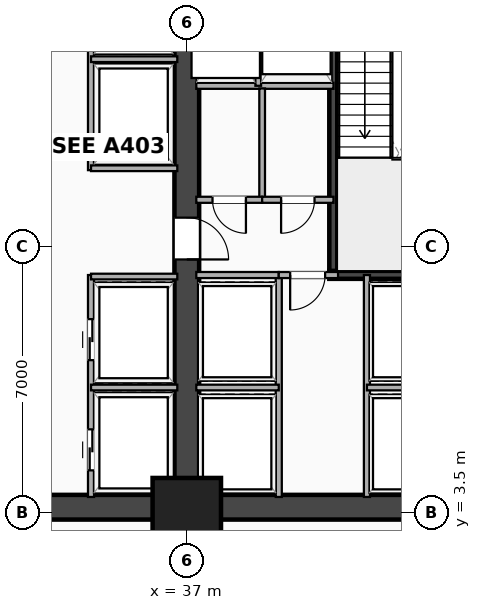
"""IFC4 building model, lengths in metres.
Left out: names, types, materials, properties, quantities, classifications, styles, units other than length and angle.
Written with IfcOpenShell. Run it as: python <this file> out.ifc"""

import sys

from ifc_helpers import new_model, si_unit, direction, frame, frame_2d, origin, origin_2d, place, context, subcontext, project, spatial, rectangle, extrude, element, fill, save


model = new_model("IFC4")
c1 = context("Model", 3, precision=1e-05, world=origin(), true_north=direction((0.0, 1.0)))
c2 = subcontext(c1, "Body", "Model", "MODEL_VIEW")
j1 = project(units=[si_unit("LENGTHUNIT", "METRE"), si_unit("PLANEANGLEUNIT", "RADIAN")], contexts=[c1])
p1 = place(None, origin())
s1 = spatial("IfcSite", under=j1, at=p1, CompositionType="ELEMENT")
p2 = place(p1, origin())
s2 = spatial("IfcBuilding", under=s1, at=p2, CompositionType="ELEMENT")
p3 = place(p2, frame((0.0, 0.0, 5.4)))
s3 = spatial("IfcBuildingStorey", under=s2, at=p3, CompositionType="ELEMENT", Elevation=5.4)
p4 = place(p3, frame((20.3, 3.63, 0.0), z_axis=(0.0, 0.0, 1.0), x_axis=(1.0, 0.0, 0.0)))
e1 = element("IfcWall", 1, at=p4, inside=s3, PredefinedType="SHEAR", context=c2, shape_type="SweptSolid", body=[
    extrude(rectangle(XDim=24.5, YDim=0.65, at=frame_2d((12.25, 0.0))), origin(), (0.0, 0.0, 1.0), 4.3),
])
p5 = place(p3, frame((37.0, 3.5, 0.0), z_axis=(0.0, 0.0, 1.0), x_axis=(0.0, 1.0, 0.0)))
e2 = element("IfcWall", 2, at=p5, inside=s3, PredefinedType="SHEAR", context=c2, shape_type="SweptSolid", body=[
    extrude(rectangle(XDim=16.9, YDim=0.65, at=frame_2d((8.45, 0.0))), origin(), (0.0, 0.0, 1.0), 4.3),
])
p6 = place(p5, frame((6.65, 0.0, 0.0)))
e3 = element("IfcOpeningElement", 3, at=p6, cuts=e2, PredefinedType="OPENING", context=c2, shape_type="SweptSolid", body=[
    extrude(rectangle(XDim=1.1, YDim=2.15, at=frame_2d((0.55, 1.075))), frame((0.0, 0.335, 0.0), z_axis=(0.0, -1.0, 0.0), x_axis=(1.0, 0.0, 0.0)), (0.0, 0.0, 1.0), 0.67),
])
p7 = place(p3, frame((40.855, 9.745, 0.0), z_axis=(0.0, 0.0, 1.0), x_axis=(0.0, 1.0, 0.0)))
e4 = element("IfcWall", 4, at=p7, inside=s3, PredefinedType="SHEAR", context=c2, shape_type="SweptSolid", body=[
    extrude(rectangle(XDim=8.01, YDim=0.21, at=frame_2d((4.005, 0.0))), origin(), (0.0, 0.0, 1.0), 4.3),
])
p8 = place(p3, frame((40.75, 9.745, 0.0), z_axis=(0.0, 0.0, 1.0), x_axis=(1.0, 0.0, 0.0)))
e5 = element("IfcWall", 5, at=p8, inside=s3, PredefinedType="SHEAR", context=c2, shape_type="SweptSolid", body=[
    extrude(rectangle(XDim=3.66, YDim=0.21, at=frame_2d((1.83, 0.0))), origin(), (0.0, 0.0, 1.0), 4.3),
])
p9 = place(p3, frame((37.0, 3.5, -0.3), z_axis=(0.0, 0.0, 1.0), x_axis=(1.0, 0.0, 0.0)))
e6 = element("IfcColumn", 6, at=p9, inside=s3, PredefinedType="COLUMN", context=c2, shape_type="SweptSolid", body=[
    extrude(rectangle(XDim=1.8, YDim=1.8, at=origin_2d()), origin(), (0.0, 0.0, 1.0), 4.6),
])
p10 = place(p3, frame((37.25, 14.72, 0.0), z_axis=(0.0, 0.0, 1.0), x_axis=(1.0, 0.0, 0.0)))
e7 = element("IfcWall", 7, at=p10, inside=s3, PredefinedType="PARTITIONING", context=c2, shape_type="SweptSolid", body=[
    extrude(rectangle(XDim=3.61, YDim=0.16, at=frame_2d((1.805, 0.0))), origin(), (0.0, 0.0, 1.0), 3.43),
])
p11 = place(p3, frame((38.88, 14.72, 0.0), z_axis=(0.0, 0.0, 1.0), x_axis=(0.0, 1.0, 0.0)))
e8 = element("IfcWall", 8, at=p11, inside=s3, PredefinedType="PARTITIONING", context=c2, shape_type="SweptSolid", body=[
    extrude(rectangle(XDim=3.04, YDim=0.15, at=frame_2d((1.52, 0.0))), origin(), (0.0, 0.0, 1.0), 4.3),
])
p12 = place(p3, frame((38.983, 11.72, 0.0), z_axis=(0.0, 0.0, 1.0), x_axis=(0.0, 1.0, 0.0)))
e9 = element("IfcWall", 9, at=p12, inside=s3, PredefinedType="PARTITIONING", context=c2, shape_type="SweptSolid", body=[
    extrude(rectangle(XDim=2.93, YDim=0.15, at=frame_2d((1.465, 0.0))), origin(), (0.0, 0.0, 1.0), 4.3),
])
p13 = place(p3, frame((37.25, 11.72, 0.0), z_axis=(0.0, 0.0, 1.0), x_axis=(1.0, 0.0, 0.0)))
e10 = element("IfcWall", 10, at=p13, inside=s3, PredefinedType="PARTITIONING", context=c2, shape_type="SweptSolid", body=[
    extrude(rectangle(XDim=1.733, YDim=0.16, at=frame_2d((0.866, 0.0))), origin(), (0.0, 0.0, 1.0), 3.43),
])
p14 = place(p13, frame((0.427, 0.0, 0.0)))
e11 = element("IfcOpeningElement", 11, at=p14, cuts=e10, PredefinedType="OPENING", context=c2, shape_type="SweptSolid", body=[
    extrude(rectangle(XDim=0.88, YDim=2.08, at=frame_2d((0.44, 1.04))), frame((0.0, 0.09, 0.0), z_axis=(0.0, -1.0, 0.0), x_axis=(1.0, 0.0, 0.0)), (0.0, 0.0, 1.0), 0.18),
])
p15 = place(p3, frame((38.983, 11.72, 0.0), z_axis=(0.0, 0.0, 1.0), x_axis=(1.0, 0.0, 0.0)))
e12 = element("IfcWall", 12, at=p15, inside=s3, PredefinedType="PARTITIONING", context=c2, shape_type="SweptSolid", body=[
    extrude(rectangle(XDim=1.877, YDim=0.16, at=frame_2d((0.938, 0.0))), origin(), (0.0, 0.0, 1.0), 4.3),
])
p16 = place(p15, frame((0.499, 0.0, 0.0)))
e13 = element("IfcOpeningElement", 13, at=p16, cuts=e12, PredefinedType="OPENING", context=c2, shape_type="SweptSolid", body=[
    extrude(rectangle(XDim=0.88, YDim=2.08, at=frame_2d((0.44, 1.04))), frame((0.0, 0.09, 0.0), z_axis=(0.0, -1.0, 0.0), x_axis=(1.0, 0.0, 0.0)), (0.0, 0.0, 1.0), 0.18),
])
for number, where, z_axis, x_axis in (
    (14, (39.42, 3.9, 0.0), (0.0, 0.0, 1.0), (0.0, 1.0, 0.0)),
    (15, (41.74, 3.9, 0.0), (0.0, 0.0, 1.0), (0.0, 1.0, 0.0)),
):
    element("IfcWall", number, at=place(p3, frame(where, z_axis=z_axis, x_axis=x_axis)), inside=s3, PredefinedType="PARTITIONING", context=c2, shape_type="SweptSolid", body=[
        extrude(rectangle(XDim=5.84, YDim=0.16, at=frame_2d((2.92, 0.0))), origin(), (0.0, 0.0, 1.0), 3.373),
    ])
p17 = place(p3, frame((37.25, 6.78, 0.0), z_axis=(0.0, 0.0, 1.0), x_axis=(1.0, 0.0, 0.0)))
e16 = element("IfcWall", 16, at=p17, inside=s3, PredefinedType="PARTITIONING", context=c2, shape_type="SweptSolid", body=[
    extrude(rectangle(XDim=2.17, YDim=0.15, at=frame_2d((1.085, 0.0))), origin(), (0.0, 0.0, 1.0), 3.43),
])
p18 = place(p3, frame((41.74, 6.78, 0.0), z_axis=(0.0, 0.0, 1.0), x_axis=(1.0, 0.0, 0.0)))
e17 = element("IfcWall", 17, at=p18, inside=s3, PredefinedType="PARTITIONING", context=c2, shape_type="SweptSolid", body=[
    extrude(rectangle(XDim=2.66, YDim=0.15, at=frame_2d((1.33, 0.0))), origin(), (0.0, 0.0, 1.0), 3.43),
])
p19 = place(p3, frame((37.25, 9.74, 0.0), z_axis=(0.0, 0.0, 1.0), x_axis=(1.0, 0.0, 0.0)))
e18 = element("IfcWall", 18, at=p19, inside=s3, PredefinedType="PARTITIONING", context=c2, shape_type="SweptSolid", body=[
    extrude(rectangle(XDim=2.17, YDim=0.16, at=frame_2d((1.085, 0.0))), origin(), (0.0, 0.0, 1.0), 3.43),
])
p20 = place(p3, frame((39.42, 9.74, 0.0), z_axis=(0.0, 0.0, 1.0), x_axis=(1.0, 0.0, 0.0)))
e19 = element("IfcWall", 19, at=p20, inside=s3, PredefinedType="PARTITIONING", context=c2, shape_type="SweptSolid", body=[
    extrude(rectangle(XDim=1.56, YDim=0.16, at=frame_2d((0.78, 0.0))), origin(), (0.0, 0.0, 1.0), 4.3),
])
p21 = place(p20, frame((0.3, 0.0, 0.0)))
e20 = element("IfcOpeningElement", 20, at=p21, cuts=e19, PredefinedType="OPENING", context=c2, shape_type="SweptSolid", body=[
    extrude(rectangle(XDim=0.92, YDim=2.08, at=frame_2d((0.46, 1.04))), frame((0.0, 0.09, 0.0), z_axis=(0.0, -1.0, 0.0), x_axis=(1.0, 0.0, 0.0)), (0.0, 0.0, 1.0), 0.18),
])
p22 = place(p3, frame((34.48, 3.9, 0.0), z_axis=(0.0, 0.0, 1.0), x_axis=(0.0, 1.0, 0.0)))
e21 = element("IfcWall", 21, at=p22, inside=s3, PredefinedType="PARTITIONING", context=c2, shape_type="SweptSolid", body=[
    extrude(rectangle(XDim=5.84, YDim=0.16, at=frame_2d((2.92, 0.0))), origin(), (0.0, 0.0, 1.0), 3.373),
])
p23 = place(p22, frame((0.7, 0.0, 0.0)))
e22 = element("IfcOpeningElement", 22, at=p23, cuts=e21, PredefinedType="OPENING", context=c2, shape_type="SweptSolid", body=[
    extrude(rectangle(XDim=1.08, YDim=2.16, at=frame_2d((0.54, 1.08))), frame((0.0, 0.09, 0.0), z_axis=(0.0, -1.0, 0.0), x_axis=(1.0, 0.0, 0.0)), (0.0, 0.0, 1.0), 0.18),
])
p24 = place(p22, frame((3.6, 0.0, 0.0)))
e23 = element("IfcOpeningElement", 23, at=p24, cuts=e21, PredefinedType="OPENING", context=c2, shape_type="SweptSolid", body=[
    extrude(rectangle(XDim=1.08, YDim=2.16, at=frame_2d((0.54, 1.08))), frame((0.0, 0.09, 0.0), z_axis=(0.0, -1.0, 0.0), x_axis=(1.0, 0.0, 0.0)), (0.0, 0.0, 1.0), 0.18),
])
for number, where, z_axis, x_axis in (
    (24, (34.48, 6.78, 0.0), (0.0, 0.0, 1.0), (1.0, 0.0, 0.0)),
    (25, (34.48, 9.7, 0.0), (0.0, 0.0, 1.0), (1.0, 0.0, 0.0)),
):
    element("IfcWall", number, at=place(p3, frame(where, z_axis=z_axis, x_axis=x_axis)), inside=s3, PredefinedType="PARTITIONING", context=c2, shape_type="SweptSolid", body=[
        extrude(rectangle(XDim=2.27, YDim=0.15, at=frame_2d((1.135, 0.0))), origin(), (0.0, 0.0, 1.0), 3.43),
    ])
p25 = place(p3, frame((34.48, 12.5, 0.0), z_axis=(0.0, 0.0, 1.0), x_axis=(0.0, 1.0, 0.0)))
e26 = element("IfcWall", 26, at=p25, inside=s3, PredefinedType="PARTITIONING", context=c2, shape_type="SweptSolid", body=[
    extrude(rectangle(XDim=7.92, YDim=0.16, at=frame_2d((3.96, 0.0))), origin(), (0.0, 0.0, 1.0), 3.373),
])
p26 = place(p25, frame((6.98, 0.0, 0.0), z_axis=(0.0, 0.0, 1.0), x_axis=(-1.0, 0.0, 0.0)))
e27 = element("IfcOpeningElement", 27, at=p26, cuts=e26, PredefinedType="OPENING", context=c2, shape_type="SweptSolid", body=[
    extrude(rectangle(XDim=0.88, YDim=2.08, at=frame_2d((0.44, 1.04))), frame((0.0, 0.09, 0.0), z_axis=(0.0, -1.0, 0.0), x_axis=(1.0, 0.0, 0.0)), (0.0, 0.0, 1.0), 0.18),
])
for number, where, z_axis, x_axis in (
    (28, (34.48, 12.55, 0.0), (0.0, 0.0, 1.0), (1.0, 0.0, 0.0)),
    (29, (34.48, 15.42, 0.0), (0.0, 0.0, 1.0), (1.0, 0.0, 0.0)),
):
    element("IfcWall", number, at=place(p3, frame(where, z_axis=z_axis, x_axis=x_axis)), inside=s3, PredefinedType="PARTITIONING", context=c2, shape_type="SweptSolid", body=[
        extrude(rectangle(XDim=2.27, YDim=0.15, at=frame_2d((1.135, 0.0))), origin(), (0.0, 0.0, 1.0), 3.43),
    ])
p27 = place(p6, origin())
e30 = element("IfcDoor", 30, at=p27, inside=s3, OperationType="SINGLE_SWING_LEFT", PredefinedType="DOOR", context=c2, shape_type="SweptSolid", body=[
    extrude(rectangle(XDim=1.1, YDim=2.15, at=frame_2d((0.55, 1.075))), frame((0.0, 0.025, 0.0), z_axis=(0.0, -1.0, 0.0), x_axis=(1.0, 0.0, 0.0)), (0.0, 0.0, 1.0), 0.05),
])
fill(e3, e30)
p28 = place(p14, origin())
e31 = element("IfcDoor", 31, at=p28, inside=s3, OperationType="SINGLE_SWING_RIGHT", PredefinedType="DOOR", context=c2, shape_type="SweptSolid", body=[
    extrude(rectangle(XDim=0.88, YDim=2.08, at=frame_2d((0.44, 1.04))), frame((0.0, 0.025, 0.0), z_axis=(0.0, -1.0, 0.0), x_axis=(1.0, 0.0, 0.0)), (0.0, 0.0, 1.0), 0.05),
])
fill(e11, e31)
p29 = place(p16, origin())
e32 = element("IfcDoor", 32, at=p29, inside=s3, OperationType="SINGLE_SWING_LEFT", PredefinedType="DOOR", context=c2, shape_type="SweptSolid", body=[
    extrude(rectangle(XDim=0.88, YDim=2.08, at=frame_2d((0.44, 1.04))), frame((0.0, 0.025, 0.0), z_axis=(0.0, -1.0, 0.0), x_axis=(1.0, 0.0, 0.0)), (0.0, 0.0, 1.0), 0.05),
])
fill(e13, e32)
p30 = place(p21, origin())
e33 = element("IfcDoor", 33, at=p30, inside=s3, OperationType="SINGLE_SWING_LEFT", PredefinedType="DOOR", context=c2, shape_type="SweptSolid", body=[
    extrude(rectangle(XDim=0.92, YDim=2.08, at=frame_2d((0.46, 1.04))), frame((0.0, 0.025, 0.0), z_axis=(0.0, -1.0, 0.0), x_axis=(1.0, 0.0, 0.0)), (0.0, 0.0, 1.0), 0.05),
])
fill(e20, e33)
p31 = place(p23, origin())
e34 = element("IfcDoor", 34, at=p31, inside=s3, OperationType="DOUBLE_DOOR_SLIDING", PredefinedType="DOOR", context=c2, shape_type="SweptSolid", body=[
    extrude(rectangle(XDim=1.08, YDim=2.16, at=frame_2d((0.54, 1.08))), frame((0.0, 0.025, 0.0), z_axis=(0.0, -1.0, 0.0), x_axis=(1.0, 0.0, 0.0)), (0.0, 0.0, 1.0), 0.05),
])
fill(e22, e34)
p32 = place(p24, origin())
e35 = element("IfcDoor", 35, at=p32, inside=s3, OperationType="DOUBLE_DOOR_SLIDING", PredefinedType="DOOR", context=c2, shape_type="SweptSolid", body=[
    extrude(rectangle(XDim=1.08, YDim=2.16, at=frame_2d((0.54, 1.08))), frame((0.0, 0.025, 0.0), z_axis=(0.0, -1.0, 0.0), x_axis=(1.0, 0.0, 0.0)), (0.0, 0.0, 1.0), 0.05),
])
fill(e23, e35)
save(model, sys.argv[1])
